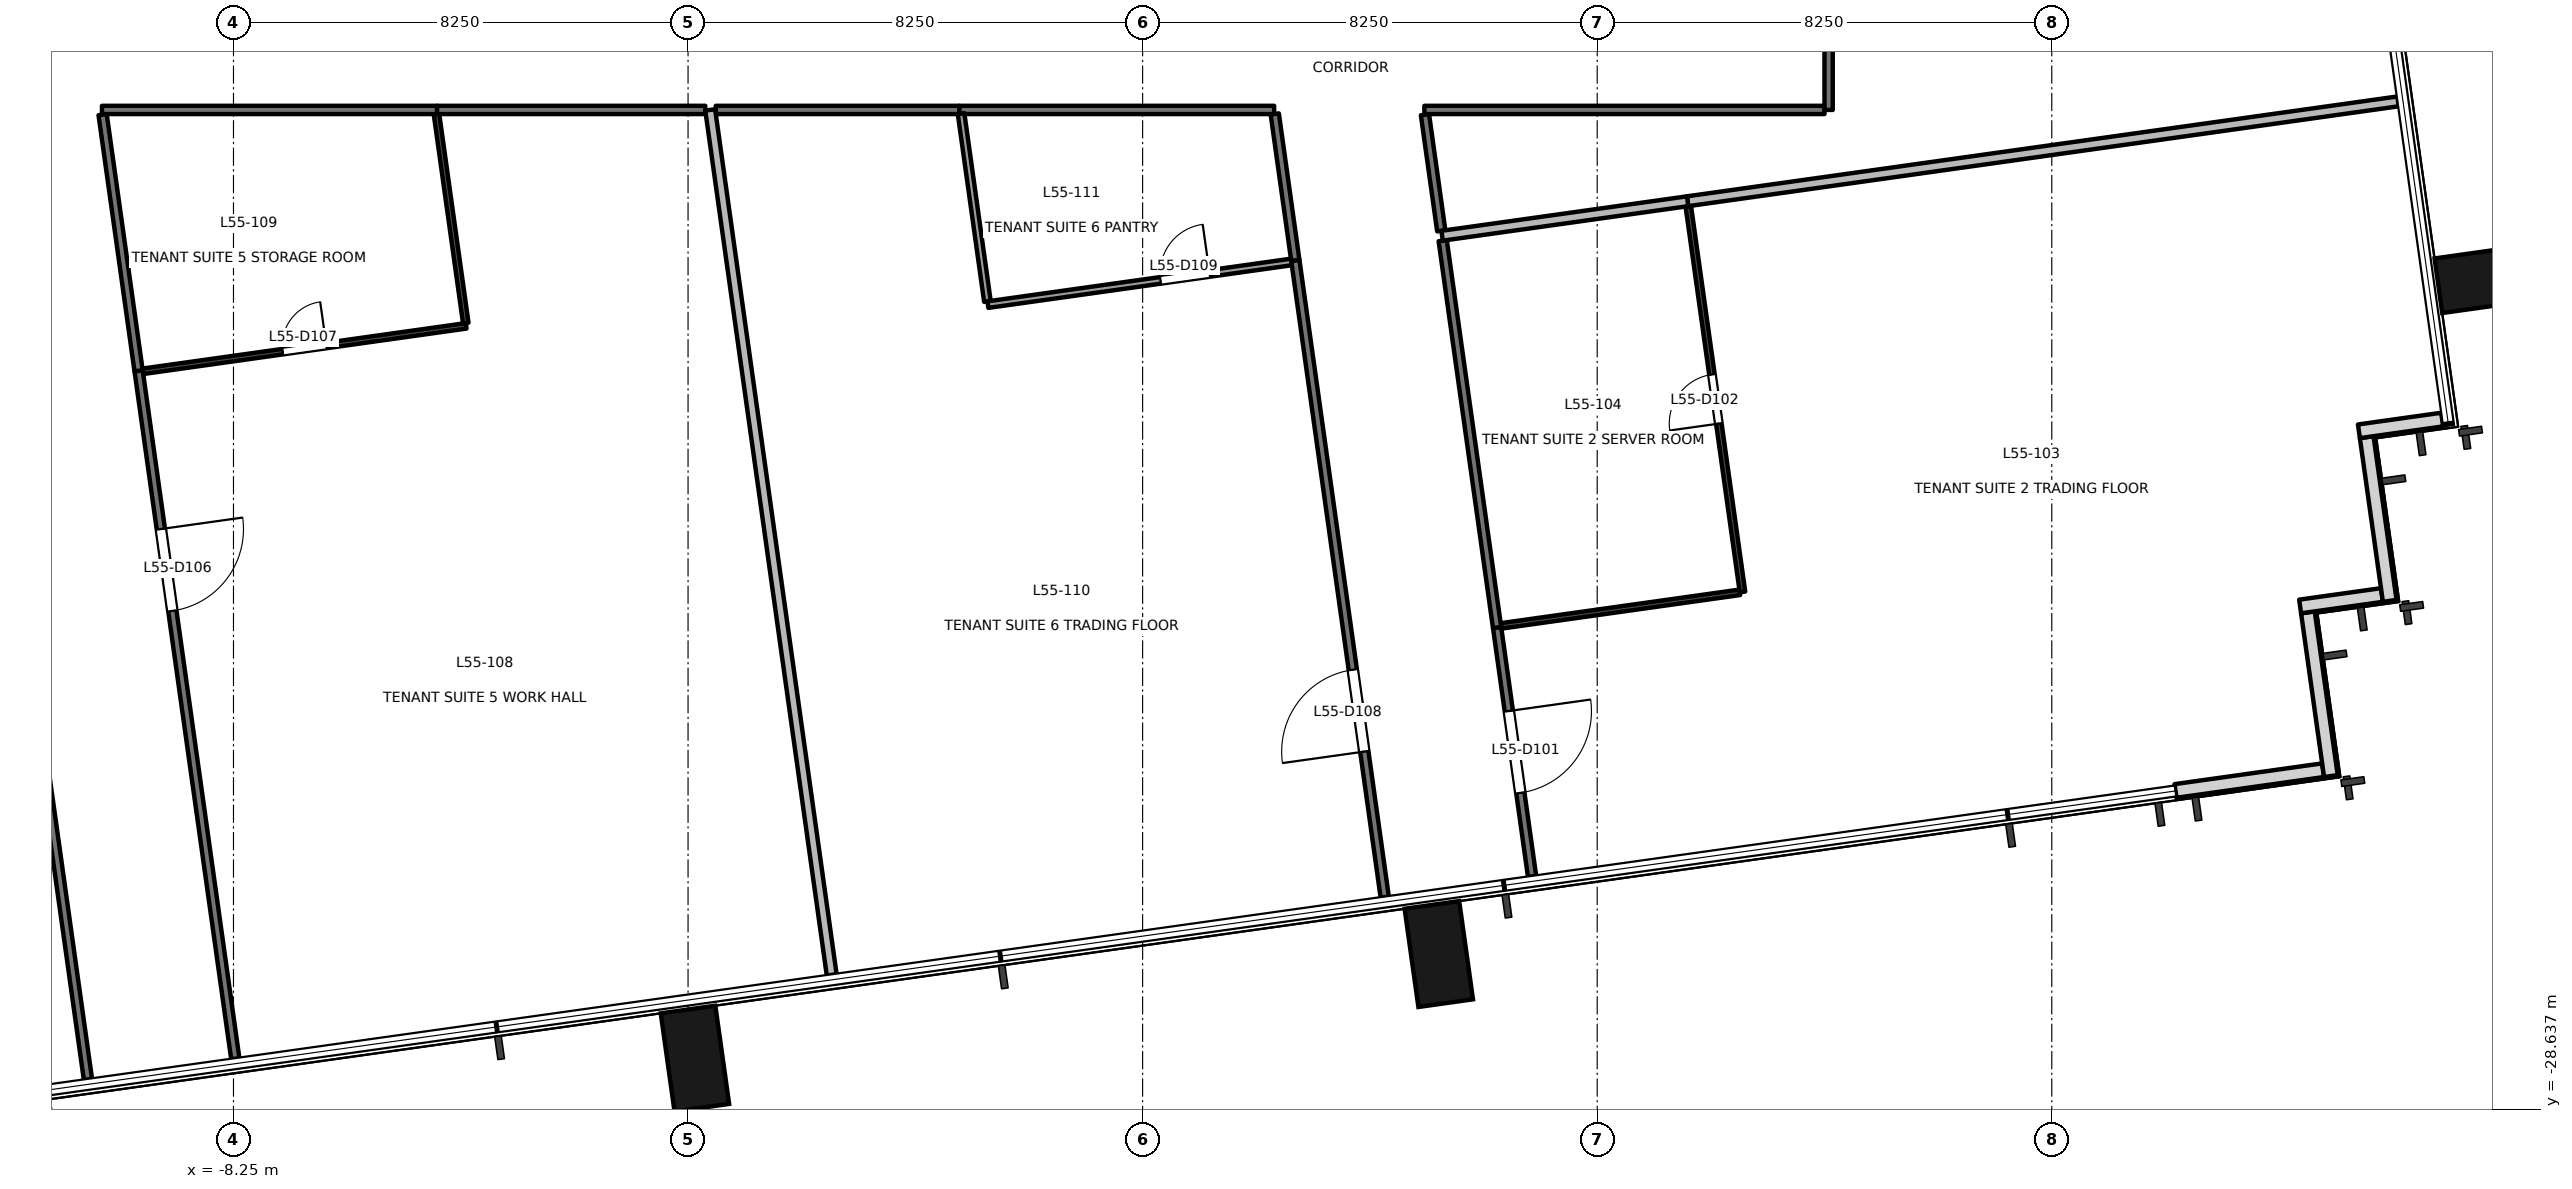
"""IFC4 building model, lengths in metres.
Left out: names, types, materials, properties, quantities, classifications, styles, units other than length and angle.
Written with IfcOpenShell. Run it as: python <this file> out.ifc"""

import sys

from ifc_helpers import new_model, si_unit, direction, frame, frame_2d, origin, origin_2d, place, context, subcontext, project, spatial, rectangle, extrude, element, fill, save


model = new_model("IFC4")
c1 = context("Model", 3, precision=1e-05, world=origin(), true_north=direction((0.0, 1.0)))
c2 = subcontext(c1, "Body", "Model", "MODEL_VIEW")
j1 = project(units=[si_unit("LENGTHUNIT", "METRE"), si_unit("PLANEANGLEUNIT", "RADIAN")], contexts=[c1])
p1 = place(None, origin())
s1 = spatial("IfcSite", under=j1, at=p1, CompositionType="ELEMENT")
p2 = place(p1, origin())
s2 = spatial("IfcBuilding", under=s1, at=p2, CompositionType="ELEMENT")
p3 = place(p2, frame((0.0, 0.0, 240.8)))
s3 = spatial("IfcBuildingStorey", under=s2, at=p3, CompositionType="ELEMENT", Elevation=240.8)
for number, where, z_axis, x_axis in (
    (1, (-11.971, -29.416, -0.2), (0.0, 0.0, 1.0), (0.99, 0.139, 0.0)),
    (2, (0.125, -27.716, -0.2), (0.0, 0.0, 1.0), (0.99, 0.139, 0.0)),
    (3, (13.625, -25.818, -0.2), (0.0, 0.0, 1.0), (0.99, 0.139, 0.0)),
    (4, (32.658, -13.565, -0.2), (0.0, 0.0, 1.0), (-0.139, 0.99, 0.0)),
):
    element("IfcColumn", number, at=place(p3, frame(where, z_axis=z_axis, x_axis=x_axis)), inside=s3, PredefinedType="COLUMN", context=c2, shape_type="SweptSolid", body=[
        extrude(rectangle(XDim=1.0, YDim=1.8, at=origin_2d()), origin(), (0.0, 0.0, 1.0), 3.9),
    ])
p4 = place(p3, frame((26.995, -22.859, 0.0), z_axis=(0.0, 0.0, 1.0), x_axis=(0.99024510326, 0.139336411139, 0.0)))
e5 = element("IfcWall", 5, at=p4, inside=s3, PredefinedType="SOLIDWALL", context=c2, shape_type="SweptSolid", body=[
    extrude(rectangle(XDim=2.705, YDim=0.25, at=frame_2d((1.353, 0.0))), origin(), (0.0, 0.0, 1.0), 3.7),
])
p5 = place(p3, frame((29.815, -22.588, 0.0), z_axis=(0.0, 0.0, 1.0), x_axis=(-0.138983028379, 0.9902947631, 0.0)))
e6 = element("IfcWall", 6, at=p5, inside=s3, PredefinedType="SOLIDWALL", context=c2, shape_type="SweptSolid", body=[
    extrude(rectangle(XDim=3.0, YDim=0.25, at=frame_2d((1.5, 0.0))), origin(), (0.0, 0.0, 1.0), 3.7),
])
p6 = place(p3, frame((29.257, -19.51, 0.0), z_axis=(0.0, 0.0, 1.0), x_axis=(0.990330117064, 0.138730887823, 0.0)))
e7 = element("IfcWall", 7, at=p6, inside=s3, PredefinedType="SOLIDWALL", context=c2, shape_type="SweptSolid", body=[
    extrude(rectangle(XDim=1.499, YDim=0.25, at=frame_2d((0.75, 0.0))), origin(), (0.0, 0.0, 1.0), 3.7),
])
p7 = place(p3, frame((30.883, -19.409, 0.0), z_axis=(0.0, 0.0, 1.0), x_axis=(-0.139324658755, 0.990246756855, 0.0)))
e8 = element("IfcWall", 8, at=p7, inside=s3, PredefinedType="SOLIDWALL", context=c2, shape_type="SweptSolid", body=[
    extrude(rectangle(XDim=3.0, YDim=0.25, at=frame_2d((1.5, 0.0))), origin(), (0.0, 0.0, 1.0), 3.7),
])
p8 = place(p3, frame((30.324, -16.332, 0.0), z_axis=(0.0, 0.0, 1.0), x_axis=(0.990238641016, 0.139382329723, 0.0)))
e9 = element("IfcWall", 9, at=p8, inside=s3, PredefinedType="SOLIDWALL", context=c2, shape_type="SweptSolid", body=[
    extrude(rectangle(XDim=1.526, YDim=0.25, at=frame_2d((0.763, 0.0))), origin(), (0.0, 0.0, 1.0), 3.7),
])
p9 = place(p3, frame((-10.891, -28.093, 0.0), z_axis=(0.0, 0.0, 1.0), x_axis=(-0.139139234553, 0.990272827764, 0.0)))
e10 = element("IfcWall", 10, at=p9, inside=s3, PredefinedType="PARTITIONING", context=c2, shape_type="SweptSolid", body=[
    extrude(rectangle(XDim=17.766, YDim=0.15, at=frame_2d((8.883, 0.0))), origin(), (0.0, 0.0, 1.0), 3.7),
])
p10 = place(p9, frame((8.133, 0.0, 0.0)))
e11 = element("IfcOpeningElement", 11, at=p10, cuts=e10, PredefinedType="OPENING", context=c2, shape_type="SweptSolid", body=[
    extrude(rectangle(XDim=1.5, YDim=2.1, at=frame_2d((0.75, 1.05))), frame((0.0, 0.085, 0.0), z_axis=(0.0, -1.0, 0.0), x_axis=(1.0, 0.0, 0.0)), (0.0, 0.0, 1.0), 0.171),
])
p11 = place(p3, frame((14.683, -19.893, 0.0), z_axis=(0.0, 0.0, 1.0), x_axis=(0.139247448871, -0.990257616978, 0.0)))
e12 = element("IfcWall", 12, at=p11, inside=s3, PredefinedType="PARTITIONING", context=c2, shape_type="SweptSolid", body=[
    extrude(rectangle(XDim=4.56, YDim=0.15, at=frame_2d((2.28, 0.0))), origin(), (0.0, 0.0, 1.0), 3.7),
])
p12 = place(p11, frame((1.53, 0.0, 0.0)))
e13 = element("IfcOpeningElement", 13, at=p12, cuts=e12, PredefinedType="OPENING", context=c2, shape_type="SweptSolid", body=[
    extrude(rectangle(XDim=1.5, YDim=2.1, at=frame_2d((0.75, 1.05))), frame((0.0, 0.085, 0.0), z_axis=(0.0, -1.0, 0.0), x_axis=(1.0, 0.0, 0.0)), (0.0, 0.0, 1.0), 0.171),
])
p13 = place(p3, frame((13.696, -12.872, 0.0), z_axis=(0.0, 0.0, 1.0), x_axis=(0.139217899128, -0.990261771736, 0.0)))
e14 = element("IfcWall", 14, at=p13, inside=s3, PredefinedType="PARTITIONING", context=c2, shape_type="SweptSolid", body=[
    extrude(rectangle(XDim=7.09, YDim=0.15, at=frame_2d((3.545, 0.0))), origin(), (0.0, 0.0, 1.0), 2.9),
])
p14 = place(p3, frame((13.374, -10.586, 0.0), z_axis=(0.0, 0.0, 1.0), x_axis=(0.13899652087, -0.990292869401, 0.0)))
e15 = element("IfcWall", 15, at=p14, inside=s3, PredefinedType="PARTITIONING", context=c2, shape_type="SweptSolid", body=[
    extrude(rectangle(XDim=2.129, YDim=0.15, at=frame_2d((1.064, 0.0))), origin(), (0.0, 0.0, 1.0), 2.9),
])
p15 = place(p3, frame((20.625, -10.5, 0.0), z_axis=(0.0, 0.0, 1.0), x_axis=(-1.0, 0.0, 0.0)))
e16 = element("IfcWall", 16, at=p15, inside=s3, PredefinedType="PARTITIONING", context=c2, shape_type="SweptSolid", body=[
    extrude(rectangle(XDim=7.262, YDim=0.15, at=frame_2d((3.631, 0.0))), origin(), (0.0, 0.0, 1.0), 2.9),
])
p16 = place(p3, frame((20.7, -2.797, 0.0), z_axis=(0.0, 0.0, 1.0), x_axis=(0.0, -1.0, 0.0)))
e17 = element("IfcWall", 17, at=p16, inside=s3, PredefinedType="PARTITIONING", context=c2, shape_type="SweptSolid", body=[
    extrude(rectangle(XDim=7.703, YDim=0.15, at=frame_2d((3.852, 0.0))), origin(), (0.0, 0.0, 1.0), 3.1),
])
p17 = place(p16, frame((3.401, 0.0, 0.0)))
e18 = element("IfcOpeningElement", 18, at=p17, cuts=e17, PredefinedType="OPENING", context=c2, shape_type="SweptSolid", body=[
    extrude(rectangle(XDim=0.9, YDim=2.1, at=frame_2d((0.45, 1.05))), frame((0.0, 0.085, 0.0), z_axis=(0.0, -1.0, 0.0), x_axis=(1.0, 0.0, 0.0)), (0.0, 0.0, 1.0), 0.171),
])
p18 = place(p3, frame((-9.972, -15.233, 0.0), z_axis=(0.0, 0.0, 1.0), x_axis=(0.139200531242, -0.990264213279, 0.0)))
e19 = element("IfcWall", 19, at=p18, inside=s3, PredefinedType="PARTITIONING", context=c2, shape_type="SweptSolid", body=[
    extrude(rectangle(XDim=12.607, YDim=0.15, at=frame_2d((6.303, 0.0))), origin(), (0.0, 0.0, 1.0), 2.8),
])
p19 = place(p18, frame((2.901, 0.0, 0.0)))
e20 = element("IfcOpeningElement", 20, at=p19, cuts=e19, PredefinedType="OPENING", context=c2, shape_type="SweptSolid", body=[
    extrude(rectangle(XDim=1.5, YDim=2.1, at=frame_2d((0.75, 1.05))), frame((0.0, 0.085, 0.0), z_axis=(0.0, -1.0, 0.0), x_axis=(1.0, 0.0, 0.0)), (0.0, 0.0, 1.0), 0.171),
])
p20 = place(p3, frame((0.313, -10.5, 0.0), z_axis=(0.0, 0.0, 1.0), x_axis=(-1.0, 0.0, 0.0)))
e21 = element("IfcWall", 21, at=p20, inside=s3, PredefinedType="PARTITIONING", context=c2, shape_type="SweptSolid", body=[
    extrude(rectangle(XDim=4.87, YDim=0.15, at=frame_2d((2.435, 0.0))), origin(), (0.0, 0.0, 1.0), 2.8),
])
p21 = place(p3, frame((-10.625, -10.585, 0.0), z_axis=(0.0, 0.0, 1.0), x_axis=(0.139112996275, -0.990276514044, 0.0)))
e22 = element("IfcWall", 22, at=p21, inside=s3, PredefinedType="PARTITIONING", context=c2, shape_type="SweptSolid", body=[
    extrude(rectangle(XDim=4.695, YDim=0.15, at=frame_2d((2.347, 0.0))), origin(), (0.0, 0.0, 1.0), 3.7),
])
p22 = place(p3, frame((-4.557, -10.5, 0.0), z_axis=(0.0, 0.0, 1.0), x_axis=(-1.0, 0.0, 0.0)))
e23 = element("IfcWall", 23, at=p22, inside=s3, PredefinedType="PARTITIONING", context=c2, shape_type="SweptSolid", body=[
    extrude(rectangle(XDim=6.08, YDim=0.15, at=frame_2d((3.04, 0.0))), origin(), (0.0, 0.0, 1.0), 2.8),
])
p23 = place(p3, frame((4.926, -10.5, 0.0), z_axis=(0.0, 0.0, 1.0), x_axis=(-1.0, 0.0, 0.0)))
e24 = element("IfcWall", 24, at=p23, inside=s3, PredefinedType="PARTITIONING", context=c2, shape_type="SweptSolid", body=[
    extrude(rectangle(XDim=4.423, YDim=0.15, at=frame_2d((2.211, 0.0))), origin(), (0.0, 0.0, 1.0), 2.8),
])
p24 = place(p3, frame((12.644, -24.785, 0.0), z_axis=(0.0, 0.0, 1.0), x_axis=(-0.139086535292, 0.990280230894, 0.0)))
e25 = element("IfcWall", 25, at=p24, inside=s3, PredefinedType="PARTITIONING", context=c2, shape_type="SweptSolid", body=[
    extrude(rectangle(XDim=11.669, YDim=0.15, at=frame_2d((5.835, 0.0))), origin(), (0.0, 0.0, 1.0), 3.7),
])
p25 = place(p24, frame((2.667, 0.0, 0.0)))
e26 = element("IfcOpeningElement", 26, at=p25, cuts=e25, PredefinedType="OPENING", context=c2, shape_type="SweptSolid", body=[
    extrude(rectangle(XDim=1.5, YDim=2.1, at=frame_2d((0.75, 1.05))), frame((0.0, 0.085, 0.0), z_axis=(0.0, -1.0, 0.0), x_axis=(1.0, 0.0, 0.0)), (0.0, 0.0, 1.0), 0.171),
])
p26 = place(p3, frame((10.637, -10.5, 0.0), z_axis=(0.0, 0.0, 1.0), x_axis=(-1.0, 0.0, 0.0)))
e27 = element("IfcWall", 27, at=p26, inside=s3, PredefinedType="PARTITIONING", context=c2, shape_type="SweptSolid", body=[
    extrude(rectangle(XDim=5.711, YDim=0.15, at=frame_2d((2.855, 0.0))), origin(), (0.0, 0.0, 1.0), 2.8),
])
p27 = place(p3, frame((11.021, -13.228, 0.0), z_axis=(0.0, 0.0, 1.0), x_axis=(-0.139139027609, 0.990272856841, 0.0)))
e28 = element("IfcWall", 28, at=p27, inside=s3, PredefinedType="PARTITIONING", context=c2, shape_type="SweptSolid", body=[
    extrude(rectangle(XDim=2.681, YDim=0.15, at=frame_2d((1.341, 0.0))), origin(), (0.0, 0.0, 1.0), 3.7),
])
p28 = place(p3, frame((14.755, -19.863, 0.0), z_axis=(0.0, 0.0, 1.0), x_axis=(0.990258502699, 0.139241149923, 0.0)))
e29 = element("IfcWall", 29, at=p28, inside=s3, PredefinedType="PARTITIONING", context=c2, shape_type="SweptSolid", body=[
    extrude(rectangle(XDim=4.375, YDim=0.1, at=frame_2d((2.188, 0.0))), origin(), (0.0, 0.0, 1.0), 3.7),
])
p29 = place(p3, frame((19.137, -19.247, 0.0), z_axis=(0.0, 0.0, 1.0), x_axis=(-0.139168056016, 0.990268777749, 0.0)))
e30 = element("IfcWall", 30, at=p29, inside=s3, PredefinedType="PARTITIONING", context=c2, shape_type="SweptSolid", body=[
    extrude(rectangle(XDim=7.07, YDim=0.1, at=frame_2d((3.535, 0.0))), origin(), (0.0, 0.0, 1.0), 3.7),
])
p30 = place(p29, frame((3.085, 0.0, 0.0)))
e31 = element("IfcOpeningElement", 31, at=p30, cuts=e30, PredefinedType="OPENING", context=c2, shape_type="SweptSolid", body=[
    extrude(rectangle(XDim=0.9, YDim=2.1, at=frame_2d((0.45, 1.05))), frame((0.0, 0.061, 0.0), z_axis=(0.0, -1.0, 0.0), x_axis=(1.0, 0.0, 0.0)), (0.0, 0.0, 1.0), 0.121),
])
p31 = place(p3, frame((18.141, -12.157, 0.0), z_axis=(0.0, 0.0, 1.0), x_axis=(0.99026760598, 0.139176393637, 0.0)))
e32 = element("IfcWall", 32, at=p31, inside=s3, PredefinedType="PARTITIONING", context=c2, shape_type="SweptSolid", body=[
    extrude(rectangle(XDim=13.02, YDim=0.18, at=frame_2d((6.51, 0.0))), origin(), (0.0, 0.0, 1.0), 3.7),
])
p32 = place(p3, frame((13.685, -12.783, 0.0), z_axis=(0.0, 0.0, 1.0), x_axis=(0.99027667576, 0.139111845094, 0.0)))
e33 = element("IfcWall", 33, at=p32, inside=s3, PredefinedType="PARTITIONING", context=c2, shape_type="SweptSolid", body=[
    extrude(rectangle(XDim=4.5, YDim=0.18, at=frame_2d((2.25, 0.0))), origin(), (0.0, 0.0, 1.0), 3.7),
])
p33 = place(p3, frame((-9.894, -15.243, 0.0), z_axis=(0.0, 0.0, 1.0), x_axis=(0.990258620858, 0.139240309595, 0.0)))
e34 = element("IfcWall", 34, at=p33, inside=s3, PredefinedType="PARTITIONING", context=c2, shape_type="SweptSolid", body=[
    extrude(rectangle(XDim=5.925, YDim=0.1, at=frame_2d((2.962, 0.0))), origin(), (0.0, 0.0, 1.0), 2.8),
])
p34 = place(p33, frame((2.562, 0.0, 0.0)))
e35 = element("IfcOpeningElement", 35, at=p34, cuts=e34, PredefinedType="OPENING", context=c2, shape_type="SweptSolid", body=[
    extrude(rectangle(XDim=0.8, YDim=2.1, at=frame_2d((0.4, 1.05))), frame((0.0, 0.061, 0.0), z_axis=(0.0, -1.0, 0.0), x_axis=(1.0, 0.0, 0.0)), (0.0, 0.0, 1.0), 0.121),
])
p35 = place(p3, frame((-4.034, -14.368, 0.0), z_axis=(0.0, 0.0, 1.0), x_axis=(-0.138899955752, 0.990306418384, 0.0)))
e36 = element("IfcWall", 36, at=p35, inside=s3, PredefinedType="PARTITIONING", context=c2, shape_type="SweptSolid", body=[
    extrude(rectangle(XDim=3.837, YDim=0.1, at=frame_2d((1.918, 0.0))), origin(), (0.0, 0.0, 1.0), 2.8),
])
p36 = place(p3, frame((0.402, -10.5, 0.0), z_axis=(0.0, 0.0, 1.0), x_axis=(0.139104966254, -0.99027764206, 0.0)))
e37 = element("IfcWall", 37, at=p36, inside=s3, PredefinedType="PARTITIONING", context=c2, shape_type="SweptSolid", body=[
    extrude(rectangle(XDim=15.85, YDim=0.18, at=frame_2d((7.925, 0.0))), origin(), (0.0, 0.0, 1.0), 3.7),
])
p37 = place(p3, frame((4.955, -10.567, 0.0), z_axis=(0.0, 0.0, 1.0), x_axis=(0.138937352788, -0.990301172372, 0.0)))
e38 = element("IfcWall", 38, at=p37, inside=s3, PredefinedType="PARTITIONING", context=c2, shape_type="SweptSolid", body=[
    extrude(rectangle(XDim=3.441, YDim=0.12, at=frame_2d((1.72, 0.0))), origin(), (0.0, 0.0, 1.0), 3.7),
])
p38 = place(p3, frame((5.442, -14.033, 0.0), z_axis=(0.0, 0.0, 1.0), x_axis=(0.990269155404, 0.139165368738, 0.0)))
e39 = element("IfcWall", 39, at=p38, inside=s3, PredefinedType="PARTITIONING", context=c2, shape_type="SweptSolid", body=[
    extrude(rectangle(XDim=5.561, YDim=0.12, at=frame_2d((2.781, 0.0))), origin(), (0.0, 0.0, 1.0), 2.8),
])
p39 = place(p38, frame((3.163, 0.0, 0.0)))
e40 = element("IfcOpeningElement", 40, at=p39, cuts=e39, PredefinedType="OPENING", context=c2, shape_type="SweptSolid", body=[
    extrude(rectangle(XDim=0.9, YDim=2.1, at=frame_2d((0.45, 1.05))), frame((0.0, 0.071, 0.0), z_axis=(0.0, -1.0, 0.0), x_axis=(1.0, 0.0, 0.0)), (0.0, 0.0, 1.0), 0.141),
])
p40 = place(p12, origin())
e41 = element("IfcDoor", 41, at=p40, inside=s3, OperationType="DOUBLE_DOOR_SINGLE_SWING", PredefinedType="DOOR", context=c2, shape_type="SweptSolid", body=[
    extrude(rectangle(XDim=1.5, YDim=2.1, at=frame_2d((0.75, 1.05))), frame((0.0, 0.025, 0.0), z_axis=(0.0, -1.0, 0.0), x_axis=(1.0, 0.0, 0.0)), (0.0, 0.0, 1.0), 0.05),
])
fill(e13, e41)
p41 = place(p30, origin())
e42 = element("IfcDoor", 42, at=p41, inside=s3, OperationType="SINGLE_SWING_LEFT", PredefinedType="DOOR", context=c2, shape_type="SweptSolid", body=[
    extrude(rectangle(XDim=0.9, YDim=2.1, at=frame_2d((0.45, 1.05))), frame((0.0, 0.025, 0.0), z_axis=(0.0, -1.0, 0.0), x_axis=(1.0, 0.0, 0.0)), (0.0, 0.0, 1.0), 0.05),
])
fill(e31, e42)
p42 = place(p19, origin())
e43 = element("IfcDoor", 43, at=p42, inside=s3, OperationType="DOUBLE_DOOR_SINGLE_SWING", PredefinedType="DOOR", context=c2, shape_type="SweptSolid", body=[
    extrude(rectangle(XDim=1.5, YDim=2.1, at=frame_2d((0.75, 1.05))), frame((0.0, 0.025, 0.0), z_axis=(0.0, -1.0, 0.0), x_axis=(1.0, 0.0, 0.0)), (0.0, 0.0, 1.0), 0.05),
])
fill(e20, e43)
p43 = place(p34, origin())
e44 = element("IfcDoor", 44, at=p43, inside=s3, OperationType="SINGLE_SWING_RIGHT", PredefinedType="DOOR", context=c2, shape_type="SweptSolid", body=[
    extrude(rectangle(XDim=0.8, YDim=2.1, at=frame_2d((0.4, 1.05))), frame((0.0, 0.025, 0.0), z_axis=(0.0, -1.0, 0.0), x_axis=(1.0, 0.0, 0.0)), (0.0, 0.0, 1.0), 0.05),
])
fill(e35, e44)
p44 = place(p25, origin())
e45 = element("IfcDoor", 45, at=p44, inside=s3, OperationType="DOUBLE_DOOR_SINGLE_SWING", PredefinedType="DOOR", context=c2, shape_type="SweptSolid", body=[
    extrude(rectangle(XDim=1.5, YDim=2.1, at=frame_2d((0.75, 1.05))), frame((0.0, 0.025, 0.0), z_axis=(0.0, -1.0, 0.0), x_axis=(1.0, 0.0, 0.0)), (0.0, 0.0, 1.0), 0.05),
])
fill(e26, e45)
p45 = place(p39, origin())
e46 = element("IfcDoor", 46, at=p45, inside=s3, OperationType="SINGLE_SWING_RIGHT", PredefinedType="DOOR", context=c2, shape_type="SweptSolid", body=[
    extrude(rectangle(XDim=0.9, YDim=2.1, at=frame_2d((0.45, 1.05))), frame((0.0, 0.025, 0.0), z_axis=(0.0, -1.0, 0.0), x_axis=(1.0, 0.0, 0.0)), (0.0, 0.0, 1.0), 0.05),
])
fill(e40, e46)
save(model, sys.argv[1])
